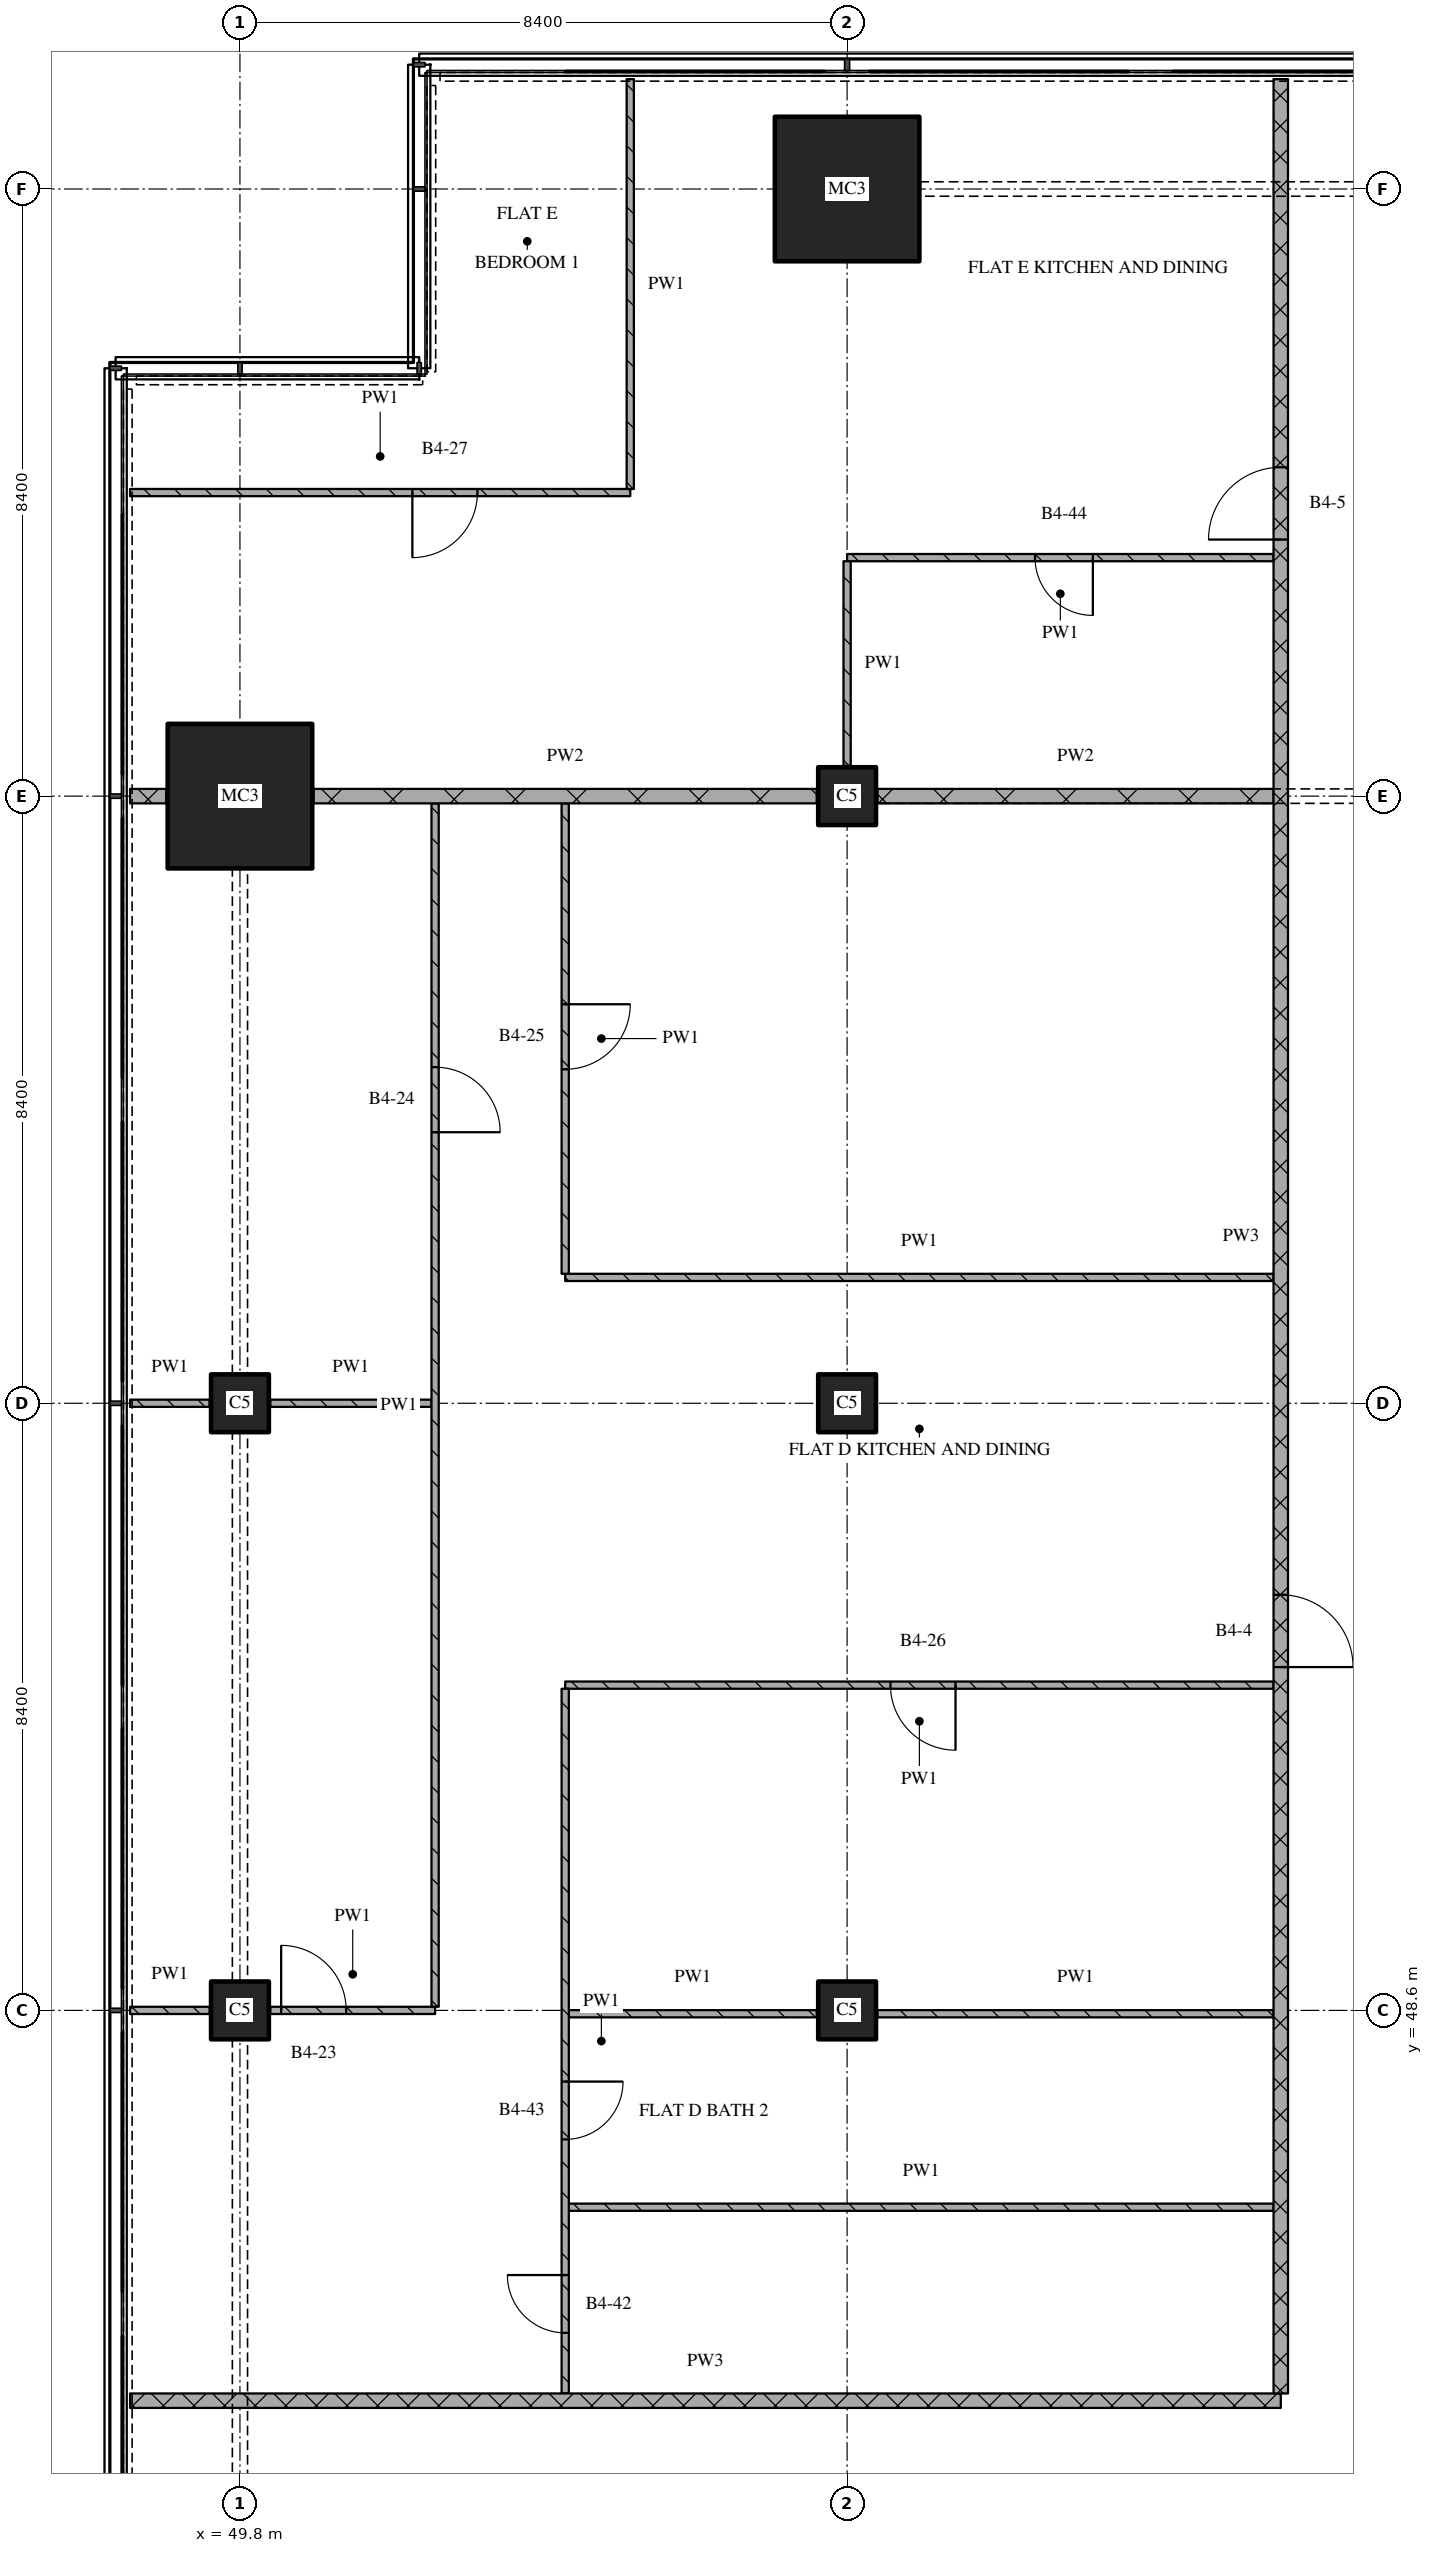
"""IFC4 building model, lengths in metres.
Left out: names, types, materials, properties, quantities, classifications, styles, units other than length and angle.
Written with IfcOpenShell. Run it as: python <this file> out.ifc"""

import sys

from ifc_helpers import new_model, si_unit, direction, frame, frame_2d, origin, origin_2d, place, context, subcontext, project, spatial, rectangle, extrude, element, fill, save


model = new_model("IFC4")
c1 = context("Model", 3, precision=1e-05, world=origin(), true_north=direction((0.0, 1.0)))
c2 = subcontext(c1, "Body", "Model", "MODEL_VIEW")
j1 = project(units=[si_unit("LENGTHUNIT", "METRE"), si_unit("PLANEANGLEUNIT", "RADIAN")], contexts=[c1])
p1 = place(None, origin())
s1 = spatial("IfcSite", under=j1, at=p1, CompositionType="ELEMENT")
p2 = place(p1, origin())
s2 = spatial("IfcBuilding", under=s1, at=p2, CompositionType="ELEMENT")
p3 = place(p2, frame((0.0, 0.0, 131.25)))
s3 = spatial("IfcBuildingStorey", under=s2, at=p3, CompositionType="ELEMENT", Elevation=131.25)
for number, where, z_axis, x_axis in (
    (1, (49.8, 48.6, 0.0), (0.0, 0.0, 1.0), (1.0, 0.0, 0.0)),
    (2, (49.8, 57.0, 0.0), (0.0, 0.0, 1.0), (1.0, 0.0, 0.0)),
):
    element("IfcColumn", number, at=place(p3, frame(where, z_axis=z_axis, x_axis=x_axis)), inside=s3, PredefinedType="COLUMN", context=c2, shape_type="SweptSolid", body=[
        extrude(rectangle(XDim=0.8, YDim=0.8, at=origin_2d()), origin(), (0.0, 0.0, 1.0), 3.6),
    ])
p4 = place(p3, frame((49.8, 65.4, 0.0), z_axis=(0.0, 0.0, 1.0), x_axis=(1.0, 0.0, 0.0)))
e3 = element("IfcColumn", 3, at=p4, inside=s3, PredefinedType="COLUMN", context=c2, shape_type="SweptSolid", body=[
    extrude(rectangle(XDim=2.0, YDim=2.0, at=origin_2d()), origin(), (0.0, 0.0, 1.0), 3.6),
])
for number, where, z_axis, x_axis in (
    (4, (58.2, 48.6, 0.0), (0.0, 0.0, 1.0), (1.0, 0.0, 0.0)),
    (5, (58.2, 57.0, 0.0), (0.0, 0.0, 1.0), (1.0, 0.0, 0.0)),
    (6, (58.2, 65.4, 0.0), (0.0, 0.0, 1.0), (1.0, 0.0, 0.0)),
):
    element("IfcColumn", number, at=place(p3, frame(where, z_axis=z_axis, x_axis=x_axis)), inside=s3, PredefinedType="COLUMN", context=c2, shape_type="SweptSolid", body=[
        extrude(rectangle(XDim=0.8, YDim=0.8, at=origin_2d()), origin(), (0.0, 0.0, 1.0), 3.6),
    ])
p5 = place(p3, frame((58.2, 73.8, 0.0), z_axis=(0.0, 0.0, 1.0), x_axis=(1.0, 0.0, 0.0)))
e7 = element("IfcColumn", 7, at=p5, inside=s3, PredefinedType="COLUMN", context=c2, shape_type="SweptSolid", body=[
    extrude(rectangle(XDim=2.0, YDim=2.0, at=origin_2d()), origin(), (0.0, 0.0, 1.0), 3.6),
])
p6 = place(p3, frame((48.28, 43.2, 0.0), z_axis=(0.0, 0.0, 1.0), x_axis=(1.0, 0.0, 0.0)))
e8 = element("IfcWall", 8, at=p6, inside=s3, PredefinedType="PARTITIONING", context=c2, shape_type="SweptSolid", body=[
    extrude(rectangle(XDim=15.92, YDim=0.2, at=frame_2d((7.96, 0.0))), origin(), (0.0, 0.0, 1.0), 3.32),
])
p7 = place(p3, frame((54.35, 45.877, 0.0), z_axis=(0.0, 0.0, 1.0), x_axis=(1.0, 0.0, 0.0)))
e9 = element("IfcWall", 9, at=p7, inside=s3, PredefinedType="PARTITIONING", context=c2, shape_type="SweptSolid", body=[
    extrude(rectangle(XDim=9.75, YDim=0.1, at=frame_2d((4.875, 0.0))), origin(), (0.0, 0.0, 1.0), 3.32),
])
p8 = place(p3, frame((54.35, 48.553, 0.0), z_axis=(0.0, 0.0, 1.0), x_axis=(1.0, 0.0, 0.0)))
e10 = element("IfcWall", 10, at=p8, inside=s3, PredefinedType="PARTITIONING", context=c2, shape_type="SweptSolid", body=[
    extrude(rectangle(XDim=3.43, YDim=0.1, at=frame_2d((1.715, 0.0))), origin(), (0.0, 0.0, 1.0), 3.32),
])
p9 = place(p3, frame((58.62, 48.553, 0.0), z_axis=(0.0, 0.0, 1.0), x_axis=(1.0, 0.0, 0.0)))
e11 = element("IfcWall", 11, at=p9, inside=s3, PredefinedType="PARTITIONING", context=c2, shape_type="SweptSolid", body=[
    extrude(rectangle(XDim=5.48, YDim=0.1, at=frame_2d((2.74, 0.0))), origin(), (0.0, 0.0, 1.0), 3.32),
])
p10 = place(p3, frame((48.28, 48.6, 0.0), z_axis=(0.0, 0.0, 1.0), x_axis=(1.0, 0.0, 0.0)))
e12 = element("IfcWall", 12, at=p10, inside=s3, PredefinedType="PARTITIONING", context=c2, shape_type="SweptSolid", body=[
    extrude(rectangle(XDim=1.1, YDim=0.1, at=frame_2d((0.55, 0.0))), origin(), (0.0, 0.0, 1.0), 3.32),
])
p11 = place(p3, frame((50.22, 48.6, 0.0), z_axis=(0.0, 0.0, 1.0), x_axis=(1.0, 0.0, 0.0)))
e13 = element("IfcWall", 13, at=p11, inside=s3, PredefinedType="PARTITIONING", context=c2, shape_type="SweptSolid", body=[
    extrude(rectangle(XDim=2.28, YDim=0.1, at=frame_2d((1.14, 0.0))), origin(), (0.0, 0.0, 1.0), 3.32),
])
p12 = place(p11, frame((0.15, 0.0, 0.0)))
e14 = element("IfcOpeningElement", 14, at=p12, cuts=e13, PredefinedType="OPENING", context=c2, shape_type="SweptSolid", body=[
    extrude(rectangle(XDim=0.9, YDim=2.1, at=frame_2d((0.45, 1.05))), frame((0.0, 0.06, 0.0), z_axis=(0.0, -1.0, 0.0), x_axis=(1.0, 0.0, 0.0)), (0.0, 0.0, 1.0), 0.12),
])
p13 = place(p3, frame((64.1, 53.1, 0.0), z_axis=(0.0, 0.0, 1.0), x_axis=(-1.0, 0.0, 0.0)))
e15 = element("IfcWall", 15, at=p13, inside=s3, PredefinedType="PARTITIONING", context=c2, shape_type="SweptSolid", body=[
    extrude(rectangle(XDim=9.8, YDim=0.1, at=frame_2d((4.9, 0.0))), origin(), (0.0, 0.0, 1.0), 3.32),
])
p14 = place(p13, frame((4.4, 0.0, 0.0)))
e16 = element("IfcOpeningElement", 16, at=p14, cuts=e15, PredefinedType="OPENING", context=c2, shape_type="SweptSolid", body=[
    extrude(rectangle(XDim=0.9, YDim=2.1, at=frame_2d((0.45, 1.05))), frame((0.0, 0.06, 0.0), z_axis=(0.0, -1.0, 0.0), x_axis=(1.0, 0.0, 0.0)), (0.0, 0.0, 1.0), 0.12),
])
p15 = place(p3, frame((48.28, 57.0, 0.0), z_axis=(0.0, 0.0, 1.0), x_axis=(1.0, 0.0, 0.0)))
e17 = element("IfcWall", 17, at=p15, inside=s3, PredefinedType="PARTITIONING", context=c2, shape_type="SweptSolid", body=[
    extrude(rectangle(XDim=1.1, YDim=0.1, at=frame_2d((0.55, 0.0))), origin(), (0.0, 0.0, 1.0), 3.32),
])
p16 = place(p3, frame((50.22, 57.0, 0.0), z_axis=(0.0, 0.0, 1.0), x_axis=(1.0, 0.0, 0.0)))
e18 = element("IfcWall", 18, at=p16, inside=s3, PredefinedType="PARTITIONING", context=c2, shape_type="SweptSolid", body=[
    extrude(rectangle(XDim=2.23, YDim=0.1, at=frame_2d((1.115, 0.0))), origin(), (0.0, 0.0, 1.0), 3.32),
])
p17 = place(p3, frame((54.3, 58.741, 0.0), z_axis=(0.0, 0.0, 1.0), x_axis=(1.0, 0.0, 0.0)))
e19 = element("IfcWall", 19, at=p17, inside=s3, PredefinedType="PARTITIONING", context=c2, shape_type="SweptSolid", body=[
    extrude(rectangle(XDim=9.8, YDim=0.1, at=frame_2d((4.9, 0.0))), origin(), (0.0, 0.0, 1.0), 3.32),
])
p18 = place(p3, frame((48.28, 65.4, 0.0), z_axis=(0.0, 0.0, 1.0), x_axis=(1.0, 0.0, 0.0)))
e20 = element("IfcWall", 20, at=p18, inside=s3, PredefinedType="PARTITIONING", context=c2, shape_type="SweptSolid", body=[
    extrude(rectangle(XDim=0.5, YDim=0.2, at=frame_2d((0.25, 0.0))), origin(), (0.0, 0.0, 1.0), 3.32),
])
p19 = place(p3, frame((50.82, 65.4, 0.0), z_axis=(0.0, 0.0, 1.0), x_axis=(1.0, 0.0, 0.0)))
e21 = element("IfcWall", 21, at=p19, inside=s3, PredefinedType="PARTITIONING", context=c2, shape_type="SweptSolid", body=[
    extrude(rectangle(XDim=6.96, YDim=0.2, at=frame_2d((3.48, 0.0))), origin(), (0.0, 0.0, 1.0), 3.32),
])
p20 = place(p3, frame((58.62, 65.4, 0.0), z_axis=(0.0, 0.0, 1.0), x_axis=(1.0, 0.0, 0.0)))
e22 = element("IfcWall", 22, at=p20, inside=s3, PredefinedType="PARTITIONING", context=c2, shape_type="SweptSolid", body=[
    extrude(rectangle(XDim=5.48, YDim=0.2, at=frame_2d((2.74, 0.0))), origin(), (0.0, 0.0, 1.0), 2.82),
])
p21 = place(p3, frame((64.1, 68.7, 0.0), z_axis=(0.0, 0.0, 1.0), x_axis=(-1.0, 0.0, 0.0)))
e23 = element("IfcWall", 23, at=p21, inside=s3, PredefinedType="PARTITIONING", context=c2, shape_type="SweptSolid", body=[
    extrude(rectangle(XDim=5.9, YDim=0.1, at=frame_2d((2.95, 0.0))), origin(), (0.0, 0.0, 1.0), 3.32),
])
p22 = place(p21, frame((2.5, 0.0, 0.0)))
e24 = element("IfcOpeningElement", 24, at=p22, cuts=e23, PredefinedType="OPENING", context=c2, shape_type="SweptSolid", body=[
    extrude(rectangle(XDim=0.8, YDim=2.1, at=frame_2d((0.4, 1.05))), frame((0.0, 0.06, 0.0), z_axis=(0.0, -1.0, 0.0), x_axis=(1.0, 0.0, 0.0)), (0.0, 0.0, 1.0), 0.12),
])
p23 = place(p3, frame((48.28, 69.6, 0.0), z_axis=(0.0, 0.0, 1.0), x_axis=(1.0, 0.0, 0.0)))
e25 = element("IfcWall", 25, at=p23, inside=s3, PredefinedType="PARTITIONING", context=c2, shape_type="SweptSolid", body=[
    extrude(rectangle(XDim=6.92, YDim=0.1, at=frame_2d((3.46, 0.0))), origin(), (0.0, 0.0, 1.0), 3.32),
])
p24 = place(p23, frame((3.905, 0.0, 0.0)))
e26 = element("IfcOpeningElement", 26, at=p24, cuts=e25, PredefinedType="OPENING", context=c2, shape_type="SweptSolid", body=[
    extrude(rectangle(XDim=0.9, YDim=2.1, at=frame_2d((0.45, 1.05))), frame((0.0, 0.06, 0.0), z_axis=(0.0, -1.0, 0.0), x_axis=(1.0, 0.0, 0.0)), (0.0, 0.0, 1.0), 0.12),
])
p25 = place(p3, frame((52.5, 48.65, 0.0), z_axis=(0.0, 0.0, 1.0), x_axis=(0.0, 1.0, 0.0)))
e27 = element("IfcWall", 27, at=p25, inside=s3, PredefinedType="PARTITIONING", context=c2, shape_type="SweptSolid", body=[
    extrude(rectangle(XDim=16.65, YDim=0.1, at=frame_2d((8.325, 0.0))), origin(), (0.0, 0.0, 1.0), 3.32),
])
p26 = place(p25, frame((12.1, 0.0, 0.0)))
e28 = element("IfcOpeningElement", 28, at=p26, cuts=e27, PredefinedType="OPENING", context=c2, shape_type="SweptSolid", body=[
    extrude(rectangle(XDim=0.9, YDim=2.1, at=frame_2d((0.45, 1.05))), frame((0.0, 0.06, 0.0), z_axis=(0.0, -1.0, 0.0), x_axis=(1.0, 0.0, 0.0)), (0.0, 0.0, 1.0), 0.12),
])
p27 = place(p3, frame((54.3, 53.05, 0.0), z_axis=(0.0, 0.0, 1.0), x_axis=(0.0, -1.0, 0.0)))
e29 = element("IfcWall", 29, at=p27, inside=s3, PredefinedType="PARTITIONING", context=c2, shape_type="SweptSolid", body=[
    extrude(rectangle(XDim=9.75, YDim=0.1, at=frame_2d((4.875, 0.0))), origin(), (0.0, 0.0, 1.0), 3.32),
])
p28 = place(p27, frame((5.435, 0.0, 0.0)))
e30 = element("IfcOpeningElement", 30, at=p28, cuts=e29, PredefinedType="OPENING", context=c2, shape_type="SweptSolid", body=[
    extrude(rectangle(XDim=0.8, YDim=2.1, at=frame_2d((0.4, 1.05))), frame((0.0, 0.06, 0.0), z_axis=(0.0, -1.0, 0.0), x_axis=(1.0, 0.0, 0.0)), (0.0, 0.0, 1.0), 0.12),
])
p29 = place(p27, frame((8.112, 0.0, 0.0)))
e31 = element("IfcOpeningElement", 31, at=p29, cuts=e29, PredefinedType="OPENING", context=c2, shape_type="SweptSolid", body=[
    extrude(rectangle(XDim=0.8, YDim=2.1, at=frame_2d((0.4, 1.05))), frame((0.0, 0.06, 0.0), z_axis=(0.0, -1.0, 0.0), x_axis=(1.0, 0.0, 0.0)), (0.0, 0.0, 1.0), 0.12),
])
p30 = place(p3, frame((54.3, 65.3, 0.0), z_axis=(0.0, 0.0, 1.0), x_axis=(0.0, -1.0, 0.0)))
e32 = element("IfcWall", 32, at=p30, inside=s3, PredefinedType="PARTITIONING", context=c2, shape_type="SweptSolid", body=[
    extrude(rectangle(XDim=6.509, YDim=0.1, at=frame_2d((3.254, 0.0))), origin(), (0.0, 0.0, 1.0), 3.32),
])
p31 = place(p30, frame((2.779, 0.0, 0.0)))
e33 = element("IfcOpeningElement", 33, at=p31, cuts=e32, PredefinedType="OPENING", context=c2, shape_type="SweptSolid", body=[
    extrude(rectangle(XDim=0.9, YDim=2.1, at=frame_2d((0.45, 1.05))), frame((0.0, 0.06, 0.0), z_axis=(0.0, -1.0, 0.0), x_axis=(1.0, 0.0, 0.0)), (0.0, 0.0, 1.0), 0.12),
])
p32 = place(p3, frame((55.2, 75.32, 0.0), z_axis=(0.0, 0.0, 1.0), x_axis=(0.0, -1.0, 0.0)))
e34 = element("IfcWall", 34, at=p32, inside=s3, PredefinedType="PARTITIONING", context=c2, shape_type="SweptSolid", body=[
    extrude(rectangle(XDim=5.67, YDim=0.1, at=frame_2d((2.835, 0.0))), origin(), (0.0, 0.0, 1.0), 3.32),
])
p33 = place(p3, frame((58.2, 68.65, 0.0), z_axis=(0.0, 0.0, 1.0), x_axis=(0.0, -1.0, 0.0)))
e35 = element("IfcWall", 35, at=p33, inside=s3, PredefinedType="PARTITIONING", context=c2, shape_type="SweptSolid", body=[
    extrude(rectangle(XDim=2.83, YDim=0.1, at=frame_2d((1.415, 0.0))), origin(), (0.0, 0.0, 1.0), 3.32),
])
p34 = place(p3, frame((64.2, 43.3, 0.0), z_axis=(0.0, 0.0, 1.0), x_axis=(0.0, 1.0, 0.0)))
e36 = element("IfcWall", 36, at=p34, inside=s3, PredefinedType="PARTITIONING", context=c2, shape_type="SweptSolid", body=[
    extrude(rectangle(XDim=32.02, YDim=0.2, at=frame_2d((16.01, 0.0))), origin(), (0.0, 0.0, 1.0), 3.32),
])
p35 = place(p34, frame((10.05, 0.0, 0.0)))
e37 = element("IfcOpeningElement", 37, at=p35, cuts=e36, PredefinedType="OPENING", context=c2, shape_type="SweptSolid", body=[
    extrude(rectangle(XDim=1.0, YDim=2.1, at=frame_2d((0.5, 1.05))), frame((0.0, 0.11, 0.0), z_axis=(0.0, -1.0, 0.0), x_axis=(1.0, 0.0, 0.0)), (0.0, 0.0, 1.0), 0.22),
])
p36 = place(p34, frame((25.65, 0.0, 0.0)))
e38 = element("IfcOpeningElement", 38, at=p36, cuts=e36, PredefinedType="OPENING", context=c2, shape_type="SweptSolid", body=[
    extrude(rectangle(XDim=1.0, YDim=2.1, at=frame_2d((0.5, 1.05))), frame((0.0, 0.11, 0.0), z_axis=(0.0, -1.0, 0.0), x_axis=(1.0, 0.0, 0.0)), (0.0, 0.0, 1.0), 0.22),
])
p37 = place(p12, origin())
e39 = element("IfcDoor", 39, at=p37, inside=s3, OperationType="SINGLE_SWING_LEFT", PredefinedType="DOOR", context=c2, shape_type="SweptSolid", body=[
    extrude(rectangle(XDim=0.9, YDim=2.1, at=frame_2d((0.45, 1.05))), frame((0.0, 0.025, 0.0), z_axis=(0.0, -1.0, 0.0), x_axis=(1.0, 0.0, 0.0)), (0.0, 0.0, 1.0), 0.05),
])
fill(e14, e39)
p38 = place(p14, origin())
e40 = element("IfcDoor", 40, at=p38, inside=s3, OperationType="SINGLE_SWING_LEFT", PredefinedType="DOOR", context=c2, shape_type="SweptSolid", body=[
    extrude(rectangle(XDim=0.9, YDim=2.1, at=frame_2d((0.45, 1.05))), frame((0.0, 0.025, 0.0), z_axis=(0.0, -1.0, 0.0), x_axis=(1.0, 0.0, 0.0)), (0.0, 0.0, 1.0), 0.05),
])
fill(e16, e40)
p39 = place(p22, origin())
e41 = element("IfcDoor", 41, at=p39, inside=s3, OperationType="SINGLE_SWING_LEFT", PredefinedType="DOOR", context=c2, shape_type="SweptSolid", body=[
    extrude(rectangle(XDim=0.8, YDim=2.1, at=frame_2d((0.4, 1.05))), frame((0.0, 0.025, 0.0), z_axis=(0.0, -1.0, 0.0), x_axis=(1.0, 0.0, 0.0)), (0.0, 0.0, 1.0), 0.05),
])
fill(e24, e41)
p40 = place(p24, origin())
e42 = element("IfcDoor", 42, at=p40, inside=s3, OperationType="SINGLE_SWING_RIGHT", PredefinedType="DOOR", context=c2, shape_type="SweptSolid", body=[
    extrude(rectangle(XDim=0.9, YDim=2.1, at=frame_2d((0.45, 1.05))), frame((0.0, 0.025, 0.0), z_axis=(0.0, -1.0, 0.0), x_axis=(1.0, 0.0, 0.0)), (0.0, 0.0, 1.0), 0.05),
])
fill(e26, e42)
p41 = place(p26, origin())
e43 = element("IfcDoor", 43, at=p41, inside=s3, OperationType="SINGLE_SWING_RIGHT", PredefinedType="DOOR", context=c2, shape_type="SweptSolid", body=[
    extrude(rectangle(XDim=0.9, YDim=2.1, at=frame_2d((0.45, 1.05))), frame((0.0, 0.025, 0.0), z_axis=(0.0, -1.0, 0.0), x_axis=(1.0, 0.0, 0.0)), (0.0, 0.0, 1.0), 0.05),
])
fill(e28, e43)
p42 = place(p28, origin())
e44 = element("IfcDoor", 44, at=p42, inside=s3, OperationType="SINGLE_SWING_LEFT", PredefinedType="DOOR", context=c2, shape_type="SweptSolid", body=[
    extrude(rectangle(XDim=0.8, YDim=2.1, at=frame_2d((0.4, 1.05))), frame((0.0, 0.025, 0.0), z_axis=(0.0, -1.0, 0.0), x_axis=(1.0, 0.0, 0.0)), (0.0, 0.0, 1.0), 0.05),
])
fill(e30, e44)
p43 = place(p29, origin())
e45 = element("IfcDoor", 45, at=p43, inside=s3, OperationType="SINGLE_SWING_RIGHT", PredefinedType="DOOR", context=c2, shape_type="SweptSolid", body=[
    extrude(rectangle(XDim=0.8, YDim=2.1, at=frame_2d((0.4, 1.05))), frame((0.0, 0.025, 0.0), z_axis=(0.0, -1.0, 0.0), x_axis=(1.0, 0.0, 0.0)), (0.0, 0.0, 1.0), 0.05),
])
fill(e31, e45)
p44 = place(p31, origin())
e46 = element("IfcDoor", 46, at=p44, inside=s3, OperationType="SINGLE_SWING_LEFT", PredefinedType="DOOR", context=c2, shape_type="SweptSolid", body=[
    extrude(rectangle(XDim=0.9, YDim=2.1, at=frame_2d((0.45, 1.05))), frame((0.0, 0.025, 0.0), z_axis=(0.0, -1.0, 0.0), x_axis=(1.0, 0.0, 0.0)), (0.0, 0.0, 1.0), 0.05),
])
fill(e33, e46)
p45 = place(p35, origin())
e47 = element("IfcDoor", 47, at=p45, inside=s3, OperationType="SINGLE_SWING_RIGHT", PredefinedType="DOOR", context=c2, shape_type="SweptSolid", body=[
    extrude(rectangle(XDim=1.0, YDim=2.1, at=frame_2d((0.5, 1.05))), frame((0.0, 0.025, 0.0), z_axis=(0.0, -1.0, 0.0), x_axis=(1.0, 0.0, 0.0)), (0.0, 0.0, 1.0), 0.05),
])
fill(e37, e47)
p46 = place(p36, origin())
e48 = element("IfcDoor", 48, at=p46, inside=s3, OperationType="SINGLE_SWING_LEFT", PredefinedType="DOOR", context=c2, shape_type="SweptSolid", body=[
    extrude(rectangle(XDim=1.0, YDim=2.1, at=frame_2d((0.5, 1.05))), frame((0.0, 0.025, 0.0), z_axis=(0.0, -1.0, 0.0), x_axis=(1.0, 0.0, 0.0)), (0.0, 0.0, 1.0), 0.05),
])
fill(e38, e48)
save(model, sys.argv[1])
